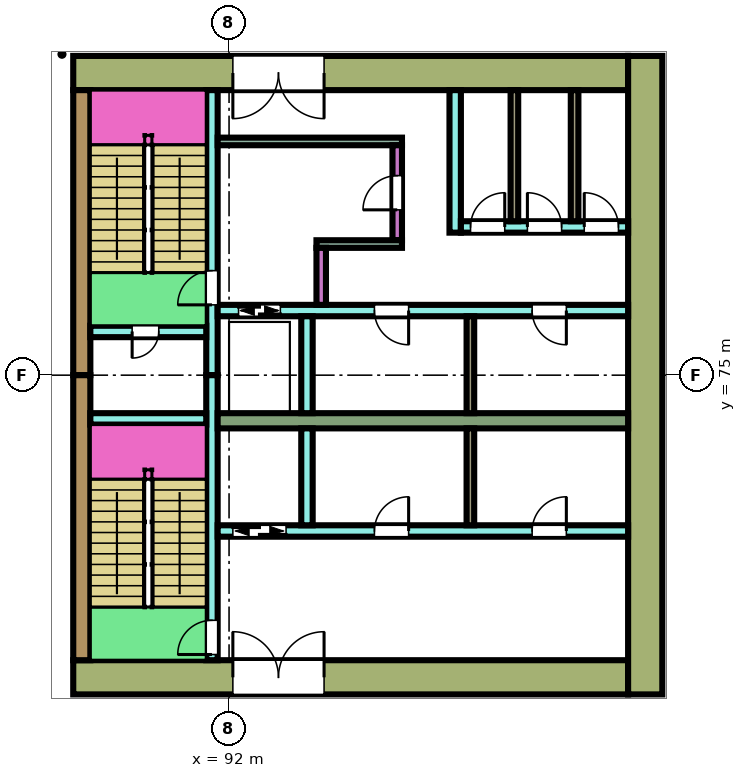
"""IFC4 building model, lengths in metres.
Left out: names, types, materials, properties, quantities, classifications, styles, units other than length and angle.
Written with IfcOpenShell. Run it as: python <this file> out.ifc"""

import sys

from ifc_helpers import new_model, si_unit, direction, frame, frame_2d, origin, place, context, subcontext, project, spatial, rectangle, extrude, element, fill, save


model = new_model("IFC4")
c1 = context("Model", 3, precision=1e-05, world=origin(), true_north=direction((0.0, 1.0)))
c2 = subcontext(c1, "Body", "Model", "MODEL_VIEW")
j1 = project(units=[si_unit("LENGTHUNIT", "METRE"), si_unit("PLANEANGLEUNIT", "RADIAN")], contexts=[c1])
p1 = place(None, origin())
s1 = spatial("IfcSite", under=j1, at=p1, CompositionType="ELEMENT")
p2 = place(p1, origin())
s2 = spatial("IfcBuilding", under=s1, at=p2, CompositionType="ELEMENT")
p3 = place(p2, frame((0.0, 0.0, -9.0)))
s3 = spatial("IfcBuildingStorey", under=s2, at=p3, CompositionType="ELEMENT", Elevation=-9.0)
p4 = place(p3, frame((87.9, 82.95, 0.0), z_axis=(0.0, 0.0, 1.0), x_axis=(1.0, 0.0, 0.0)))
e1 = element("IfcWall", 1, at=p4, inside=s3, PredefinedType="SHEAR", context=c2, shape_type="SweptSolid", body=[
    extrude(rectangle(XDim=14.6, YDim=0.9, at=frame_2d((7.3, 0.0))), origin(), (0.0, 0.0, 1.0), 4.1),
])
p5 = place(p4, frame((4.2, 0.0, 0.0)))
e2 = element("IfcOpeningElement", 2, at=p5, cuts=e1, PredefinedType="OPENING", context=c2, shape_type="SweptSolid", body=[
    extrude(rectangle(XDim=2.4, YDim=2.4, at=frame_2d((1.2, 1.2))), frame((0.0, 0.46, 0.0), z_axis=(0.0, -1.0, 0.0), x_axis=(1.0, 0.0, 0.0)), (0.0, 0.0, 1.0), 0.92),
])
p6 = place(p3, frame((87.9, 67.05, 0.0), z_axis=(0.0, 0.0, 1.0), x_axis=(1.0, 0.0, 0.0)))
e3 = element("IfcWall", 3, at=p6, inside=s3, PredefinedType="SHEAR", context=c2, shape_type="SweptSolid", body=[
    extrude(rectangle(XDim=14.6, YDim=0.9, at=frame_2d((7.3, 0.0))), origin(), (0.0, 0.0, 1.0), 4.1),
])
p7 = place(p6, frame((4.2, 0.0, 0.0)))
e4 = element("IfcOpeningElement", 4, at=p7, cuts=e3, PredefinedType="OPENING", context=c2, shape_type="SweptSolid", body=[
    extrude(rectangle(XDim=2.4, YDim=2.4, at=frame_2d((1.2, 1.2))), frame((0.0, 0.46, 0.0), z_axis=(0.0, -1.0, 0.0), x_axis=(1.0, 0.0, 0.0)), (0.0, 0.0, 1.0), 0.92),
])
for number, where, z_axis, x_axis in (
    (5, (88.125, 75.0, 0.0), (0.0, 0.0, 1.0), (0.0, 1.0, 0.0)),
    (6, (88.125, 67.5, 0.0), (0.0, 0.0, 1.0), (0.0, 1.0, 0.0)),
):
    element("IfcWall", number, at=place(p3, frame(where, z_axis=z_axis, x_axis=x_axis)), inside=s3, PredefinedType="SHEAR", context=c2, shape_type="SweptSolid", body=[
        extrude(rectangle(XDim=7.5, YDim=0.45, at=frame_2d((3.75, 0.0))), origin(), (0.0, 0.0, 1.0), 4.1),
    ])
p8 = place(p3, frame((102.95, 66.6, 0.0), z_axis=(0.0, 0.0, 1.0), x_axis=(0.0, 1.0, 0.0)))
e7 = element("IfcWall", 7, at=p8, inside=s3, PredefinedType="SHEAR", context=c2, shape_type="SweptSolid", body=[
    extrude(rectangle(XDim=16.8, YDim=0.9, at=frame_2d((8.4, 0.0))), origin(), (0.0, 0.0, 1.0), 4.1),
])
p9 = place(p3, frame((91.55, 75.0, 0.0), z_axis=(0.0, 0.0, 1.0), x_axis=(0.0, 1.0, 0.0)))
e8 = element("IfcWall", 8, at=p9, inside=s3, PredefinedType="SHEAR", context=c2, shape_type="SweptSolid", body=[
    extrude(rectangle(XDim=7.5, YDim=0.3, at=frame_2d((3.75, 0.0))), origin(), (0.0, 0.0, 1.0), 4.1),
])
p10 = place(p9, frame((1.85, 0.0, 0.0)))
e9 = element("IfcOpeningElement", 9, at=p10, cuts=e8, PredefinedType="OPENING", context=c2, shape_type="SweptSolid", body=[
    extrude(rectangle(XDim=0.9, YDim=2.1, at=frame_2d((0.45, 1.05))), frame((0.0, 0.16, 0.0), z_axis=(0.0, -1.0, 0.0), x_axis=(1.0, 0.0, 0.0)), (0.0, 0.0, 1.0), 0.32),
])
p11 = place(p3, frame((91.55, 67.5, 0.0), z_axis=(0.0, 0.0, 1.0), x_axis=(0.0, 1.0, 0.0)))
e10 = element("IfcWall", 10, at=p11, inside=s3, PredefinedType="SHEAR", context=c2, shape_type="SweptSolid", body=[
    extrude(rectangle(XDim=7.5, YDim=0.3, at=frame_2d((3.75, 0.0))), origin(), (0.0, 0.0, 1.0), 4.1),
])
p12 = place(p11, frame((0.15, 0.0, 0.0)))
e11 = element("IfcOpeningElement", 11, at=p12, cuts=e10, PredefinedType="OPENING", context=c2, shape_type="SweptSolid", body=[
    extrude(rectangle(XDim=0.9, YDim=2.1, at=frame_2d((0.45, 1.05))), frame((0.0, 0.16, 0.0), z_axis=(0.0, -1.0, 0.0), x_axis=(1.0, 0.0, 0.0)), (0.0, 0.0, 1.0), 0.32),
])
p13 = place(p3, frame((88.35, 76.15, 0.0), z_axis=(0.0, 0.0, 1.0), x_axis=(1.0, 0.0, 0.0)))
e12 = element("IfcWall", 12, at=p13, inside=s3, PredefinedType="SHEAR", context=c2, shape_type="SweptSolid", body=[
    extrude(rectangle(XDim=3.05, YDim=0.3, at=frame_2d((1.525, 0.0))), origin(), (0.0, 0.0, 1.0), 4.1),
])
p14 = place(p13, frame((1.1, 0.0, 0.0)))
e13 = element("IfcOpeningElement", 13, at=p14, cuts=e12, PredefinedType="OPENING", context=c2, shape_type="SweptSolid", body=[
    extrude(rectangle(XDim=0.7, YDim=2.0, at=frame_2d((0.35, 1.0))), frame((0.0, 0.16, 0.0), z_axis=(0.0, -1.0, 0.0), x_axis=(1.0, 0.0, 0.0)), (0.0, 0.0, 1.0), 0.32),
])
p15 = place(p3, frame((88.35, 73.85, 0.0), z_axis=(0.0, 0.0, 1.0), x_axis=(1.0, 0.0, 0.0)))
e14 = element("IfcWall", 14, at=p15, inside=s3, PredefinedType="SHEAR", context=c2, shape_type="SweptSolid", body=[
    extrude(rectangle(XDim=3.05, YDim=0.3, at=frame_2d((1.525, 0.0))), origin(), (0.0, 0.0, 1.0), 4.1),
])
p16 = place(p3, frame((91.7, 76.7, 0.0), z_axis=(0.0, 0.0, 1.0), x_axis=(1.0, 0.0, 0.0)))
e15 = element("IfcWall", 15, at=p16, inside=s3, PredefinedType="SHEAR", context=c2, shape_type="SweptSolid", body=[
    extrude(rectangle(XDim=10.8, YDim=0.3, at=frame_2d((5.4, 0.0))), origin(), (0.0, 0.0, 1.0), 4.1),
])
p17 = place(p16, frame((0.55, 0.0, 0.0)))
e16 = element("IfcOpeningElement", 16, at=p17, cuts=e15, PredefinedType="OPENING", context=c2, shape_type="SweptSolid", body=[
    extrude(rectangle(XDim=1.1, YDim=2.1, at=frame_2d((0.55, 1.05))), frame((0.0, 0.16, 0.0), z_axis=(0.0, -1.0, 0.0), x_axis=(1.0, 0.0, 0.0)), (0.0, 0.0, 1.0), 0.32),
])
p18 = place(p16, frame((4.125, 0.0, 0.0)))
e17 = element("IfcOpeningElement", 17, at=p18, cuts=e15, PredefinedType="OPENING", context=c2, shape_type="SweptSolid", body=[
    extrude(rectangle(XDim=0.9, YDim=2.1, at=frame_2d((0.45, 1.05))), frame((0.0, 0.16, 0.0), z_axis=(0.0, -1.0, 0.0), x_axis=(1.0, 0.0, 0.0)), (0.0, 0.0, 1.0), 0.32),
])
p19 = place(p16, frame((8.275, 0.0, 0.0)))
e18 = element("IfcOpeningElement", 18, at=p19, cuts=e15, PredefinedType="OPENING", context=c2, shape_type="SweptSolid", body=[
    extrude(rectangle(XDim=0.9, YDim=2.1, at=frame_2d((0.45, 1.05))), frame((0.0, 0.16, 0.0), z_axis=(0.0, -1.0, 0.0), x_axis=(1.0, 0.0, 0.0)), (0.0, 0.0, 1.0), 0.32),
])
p20 = place(p3, frame((91.7, 73.8, 0.0), z_axis=(0.0, 0.0, 1.0), x_axis=(1.0, 0.0, 0.0)))
e19 = element("IfcWall", 19, at=p20, inside=s3, PredefinedType="SHEAR", context=c2, shape_type="SweptSolid", body=[
    extrude(rectangle(XDim=10.8, YDim=0.4, at=frame_2d((5.4, 0.0))), origin(), (0.0, 0.0, 1.0), 4.1),
])
p21 = place(p3, frame((91.7, 70.9, 0.0), z_axis=(0.0, 0.0, 1.0), x_axis=(1.0, 0.0, 0.0)))
e20 = element("IfcWall", 20, at=p21, inside=s3, PredefinedType="SHEAR", context=c2, shape_type="SweptSolid", body=[
    extrude(rectangle(XDim=10.8, YDim=0.3, at=frame_2d((5.4, 0.0))), origin(), (0.0, 0.0, 1.0), 4.1),
])
p22 = place(p21, frame((0.4, 0.0, 0.0)))
e21 = element("IfcOpeningElement", 21, at=p22, cuts=e20, PredefinedType="OPENING", context=c2, shape_type="SweptSolid", body=[
    extrude(rectangle(XDim=1.4, YDim=2.1, at=frame_2d((0.7, 1.05))), frame((0.0, 0.16, 0.0), z_axis=(0.0, -1.0, 0.0), x_axis=(1.0, 0.0, 0.0)), (0.0, 0.0, 1.0), 0.32),
])
p23 = place(p21, frame((4.125, 0.0, 0.0)))
e22 = element("IfcOpeningElement", 22, at=p23, cuts=e20, PredefinedType="OPENING", context=c2, shape_type="SweptSolid", body=[
    extrude(rectangle(XDim=0.9, YDim=2.1, at=frame_2d((0.45, 1.05))), frame((0.0, 0.16, 0.0), z_axis=(0.0, -1.0, 0.0), x_axis=(1.0, 0.0, 0.0)), (0.0, 0.0, 1.0), 0.32),
])
p24 = place(p21, frame((8.275, 0.0, 0.0)))
e23 = element("IfcOpeningElement", 23, at=p24, cuts=e20, PredefinedType="OPENING", context=c2, shape_type="SweptSolid", body=[
    extrude(rectangle(XDim=0.9, YDim=2.1, at=frame_2d((0.45, 1.05))), frame((0.0, 0.16, 0.0), z_axis=(0.0, -1.0, 0.0), x_axis=(1.0, 0.0, 0.0)), (0.0, 0.0, 1.0), 0.32),
])
for number, where, z_axis, x_axis in (
    (24, (94.05, 74.0, 0.0), (0.0, 0.0, 1.0), (0.0, 1.0, 0.0)),
    (25, (94.05, 71.05, 0.0), (0.0, 0.0, 1.0), (0.0, 1.0, 0.0)),
):
    element("IfcWall", number, at=place(p3, frame(where, z_axis=z_axis, x_axis=x_axis)), inside=s3, PredefinedType="SHEAR", context=c2, shape_type="SweptSolid", body=[
        extrude(rectangle(XDim=2.55, YDim=0.3, at=frame_2d((1.275, 0.0))), origin(), (0.0, 0.0, 1.0), 4.1),
    ])
p25 = place(p3, frame((91.7, 81.15, 0.0), z_axis=(0.0, 0.0, 1.0), x_axis=(1.0, 0.0, 0.0)))
e26 = element("IfcWall", 26, at=p25, inside=s3, PredefinedType="SHEAR", context=c2, shape_type="SweptSolid", body=[
    extrude(rectangle(XDim=4.85, YDim=0.2, at=frame_2d((2.425, 0.0))), origin(), (0.0, 0.0, 1.0), 4.1),
])
p26 = place(p3, frame((96.425, 78.55, 0.0), z_axis=(0.0, 0.0, 1.0), x_axis=(0.0, 1.0, 0.0)))
e27 = element("IfcWall", 27, at=p26, inside=s3, PredefinedType="SHEAR", context=c2, shape_type="SweptSolid", body=[
    extrude(rectangle(XDim=2.5, YDim=0.25, at=frame_2d((1.25, 0.0))), origin(), (0.0, 0.0, 1.0), 4.1),
])
p27 = place(p26, frame((0.8, 0.0, 0.0)))
e28 = element("IfcOpeningElement", 28, at=p27, cuts=e27, PredefinedType="OPENING", context=c2, shape_type="SweptSolid", body=[
    extrude(rectangle(XDim=0.9, YDim=2.1, at=frame_2d((0.45, 1.05))), frame((0.0, 0.135, 0.0), z_axis=(0.0, -1.0, 0.0), x_axis=(1.0, 0.0, 0.0)), (0.0, 0.0, 1.0), 0.27),
])
p28 = place(p3, frame((94.3, 78.45, 0.0), z_axis=(0.0, 0.0, 1.0), x_axis=(1.0, 0.0, 0.0)))
e29 = element("IfcWall", 29, at=p28, inside=s3, PredefinedType="SHEAR", context=c2, shape_type="SweptSolid", body=[
    extrude(rectangle(XDim=2.25, YDim=0.2, at=frame_2d((1.125, 0.0))), origin(), (0.0, 0.0, 1.0), 4.1),
])
p29 = place(p3, frame((94.425, 76.85, 0.0), z_axis=(0.0, 0.0, 1.0), x_axis=(0.0, 1.0, 0.0)))
e30 = element("IfcWall", 30, at=p29, inside=s3, PredefinedType="SHEAR", context=c2, shape_type="SweptSolid", body=[
    extrude(rectangle(XDim=1.5, YDim=0.25, at=frame_2d((0.75, 0.0))), origin(), (0.0, 0.0, 1.0), 4.1),
])
p30 = place(p3, frame((97.95, 78.75, 0.0), z_axis=(0.0, 0.0, 1.0), x_axis=(0.0, 1.0, 0.0)))
e31 = element("IfcWall", 31, at=p30, inside=s3, PredefinedType="SHEAR", context=c2, shape_type="SweptSolid", body=[
    extrude(rectangle(XDim=3.75, YDim=0.3, at=frame_2d((1.875, 0.0))), origin(), (0.0, 0.0, 1.0), 4.1),
])
p31 = place(p3, frame((98.1, 78.9, 0.0), z_axis=(0.0, 0.0, 1.0), x_axis=(1.0, 0.0, 0.0)))
e32 = element("IfcWall", 32, at=p31, inside=s3, PredefinedType="SHEAR", context=c2, shape_type="SweptSolid", body=[
    extrude(rectangle(XDim=4.4, YDim=0.3, at=frame_2d((2.2, 0.0))), origin(), (0.0, 0.0, 1.0), 4.1),
])
p32 = place(p31, frame((0.254, 0.0, 0.0)))
e33 = element("IfcOpeningElement", 33, at=p32, cuts=e32, PredefinedType="OPENING", context=c2, shape_type="SweptSolid", body=[
    extrude(rectangle(XDim=0.9, YDim=2.1, at=frame_2d((0.45, 1.05))), frame((0.0, 0.16, 0.0), z_axis=(0.0, -1.0, 0.0), x_axis=(1.0, 0.0, 0.0)), (0.0, 0.0, 1.0), 0.32),
])
p33 = place(p31, frame((1.75, 0.0, 0.0)))
e34 = element("IfcOpeningElement", 34, at=p33, cuts=e32, PredefinedType="OPENING", context=c2, shape_type="SweptSolid", body=[
    extrude(rectangle(XDim=0.9, YDim=2.1, at=frame_2d((0.45, 1.05))), frame((0.0, 0.16, 0.0), z_axis=(0.0, -1.0, 0.0), x_axis=(1.0, 0.0, 0.0)), (0.0, 0.0, 1.0), 0.32),
])
p34 = place(p31, frame((3.246, 0.0, 0.0)))
e35 = element("IfcOpeningElement", 35, at=p34, cuts=e32, PredefinedType="OPENING", context=c2, shape_type="SweptSolid", body=[
    extrude(rectangle(XDim=0.9, YDim=2.1, at=frame_2d((0.45, 1.05))), frame((0.0, 0.16, 0.0), z_axis=(0.0, -1.0, 0.0), x_axis=(1.0, 0.0, 0.0)), (0.0, 0.0, 1.0), 0.32),
])
for number, where, z_axis, x_axis in (
    (36, (98.35, 74.0, 0.0), (0.0, 0.0, 1.0), (0.0, 1.0, 0.0)),
    (37, (98.35, 71.05, 0.0), (0.0, 0.0, 1.0), (0.0, 1.0, 0.0)),
):
    element("IfcWall", number, at=place(p3, frame(where, z_axis=z_axis, x_axis=x_axis)), inside=s3, PredefinedType="PARTITIONING", context=c2, shape_type="SweptSolid", body=[
        extrude(rectangle(XDim=2.55, YDim=0.2, at=frame_2d((1.275, 0.0))), origin(), (0.0, 0.0, 1.0), 4.1),
    ])
for number, where, z_axis, x_axis in (
    (38, (99.508, 79.05, 0.0), (0.0, 0.0, 1.0), (0.0, 1.0, 0.0)),
    (39, (101.092, 79.05, 0.0), (0.0, 0.0, 1.0), (0.0, 1.0, 0.0)),
):
    element("IfcWall", number, at=place(p3, frame(where, z_axis=z_axis, x_axis=x_axis)), inside=s3, PredefinedType="PARTITIONING", context=c2, shape_type="SweptSolid", body=[
        extrude(rectangle(XDim=3.45, YDim=0.2, at=frame_2d((1.725, 0.0))), origin(), (0.0, 0.0, 1.0), 4.1),
    ])
p35 = place(p14, frame((0.7, 0.0, 0.0), z_axis=(0.0, 0.0, 1.0), x_axis=(-1.0, 0.0, 0.0)))
e40 = element("IfcDoor", 40, at=p35, inside=s3, OperationType="SINGLE_SWING_RIGHT", PredefinedType="DOOR", context=c2, shape_type="SweptSolid", body=[
    extrude(rectangle(XDim=0.7, YDim=2.0, at=frame_2d((0.35, 1.0))), frame((0.0, 0.025, 0.0), z_axis=(0.0, -1.0, 0.0), x_axis=(1.0, 0.0, 0.0)), (0.0, 0.0, 1.0), 0.05),
])
fill(e13, e40)
p36 = place(p10, origin())
e41 = element("IfcDoor", 41, at=p36, inside=s3, OperationType="SINGLE_SWING_LEFT", PredefinedType="DOOR", context=c2, shape_type="SweptSolid", body=[
    extrude(rectangle(XDim=0.9, YDim=2.1, at=frame_2d((0.45, 1.05))), frame((0.0, 0.025, 0.0), z_axis=(0.0, -1.0, 0.0), x_axis=(1.0, 0.0, 0.0)), (0.0, 0.0, 1.0), 0.05),
])
fill(e9, e41)
p37 = place(p12, origin())
e42 = element("IfcDoor", 42, at=p37, inside=s3, OperationType="SINGLE_SWING_LEFT", PredefinedType="DOOR", context=c2, shape_type="SweptSolid", body=[
    extrude(rectangle(XDim=0.9, YDim=2.1, at=frame_2d((0.45, 1.05))), frame((0.0, 0.025, 0.0), z_axis=(0.0, -1.0, 0.0), x_axis=(1.0, 0.0, 0.0)), (0.0, 0.0, 1.0), 0.05),
])
fill(e11, e42)
p38 = place(p17, origin())
e43 = element("IfcDoor", 43, at=p38, inside=s3, OperationType="DOUBLE_DOOR_SLIDING", PredefinedType="DOOR", context=c2, shape_type="SweptSolid", body=[
    extrude(rectangle(XDim=1.1, YDim=2.1, at=frame_2d((0.55, 1.05))), frame((0.0, 0.025, 0.0), z_axis=(0.0, -1.0, 0.0), x_axis=(1.0, 0.0, 0.0)), (0.0, 0.0, 1.0), 0.05),
])
fill(e16, e43)
p39 = place(p18, frame((0.9, 0.0, 0.0), z_axis=(0.0, 0.0, 1.0), x_axis=(-1.0, 0.0, 0.0)))
e44 = element("IfcDoor", 44, at=p39, inside=s3, OperationType="SINGLE_SWING_LEFT", PredefinedType="DOOR", context=c2, shape_type="SweptSolid", body=[
    extrude(rectangle(XDim=0.9, YDim=2.1, at=frame_2d((0.45, 1.05))), frame((0.0, 0.025, 0.0), z_axis=(0.0, -1.0, 0.0), x_axis=(1.0, 0.0, 0.0)), (0.0, 0.0, 1.0), 0.05),
])
fill(e17, e44)
p40 = place(p19, frame((0.9, 0.0, 0.0), z_axis=(0.0, 0.0, 1.0), x_axis=(-1.0, 0.0, 0.0)))
e45 = element("IfcDoor", 45, at=p40, inside=s3, OperationType="SINGLE_SWING_LEFT", PredefinedType="DOOR", context=c2, shape_type="SweptSolid", body=[
    extrude(rectangle(XDim=0.9, YDim=2.1, at=frame_2d((0.45, 1.05))), frame((0.0, 0.025, 0.0), z_axis=(0.0, -1.0, 0.0), x_axis=(1.0, 0.0, 0.0)), (0.0, 0.0, 1.0), 0.05),
])
fill(e18, e45)
p41 = place(p22, origin())
e46 = element("IfcDoor", 46, at=p41, inside=s3, OperationType="DOUBLE_DOOR_SLIDING", PredefinedType="DOOR", context=c2, shape_type="SweptSolid", body=[
    extrude(rectangle(XDim=1.4, YDim=2.1, at=frame_2d((0.7, 1.05))), frame((0.0, 0.025, 0.0), z_axis=(0.0, -1.0, 0.0), x_axis=(1.0, 0.0, 0.0)), (0.0, 0.0, 1.0), 0.05),
])
fill(e21, e46)
p42 = place(p23, origin())
e47 = element("IfcDoor", 47, at=p42, inside=s3, OperationType="SINGLE_SWING_RIGHT", PredefinedType="DOOR", context=c2, shape_type="SweptSolid", body=[
    extrude(rectangle(XDim=0.9, YDim=2.1, at=frame_2d((0.45, 1.05))), frame((0.0, 0.025, 0.0), z_axis=(0.0, -1.0, 0.0), x_axis=(1.0, 0.0, 0.0)), (0.0, 0.0, 1.0), 0.05),
])
fill(e22, e47)
p43 = place(p24, origin())
e48 = element("IfcDoor", 48, at=p43, inside=s3, OperationType="SINGLE_SWING_RIGHT", PredefinedType="DOOR", context=c2, shape_type="SweptSolid", body=[
    extrude(rectangle(XDim=0.9, YDim=2.1, at=frame_2d((0.45, 1.05))), frame((0.0, 0.025, 0.0), z_axis=(0.0, -1.0, 0.0), x_axis=(1.0, 0.0, 0.0)), (0.0, 0.0, 1.0), 0.05),
])
fill(e23, e48)
p44 = place(p27, origin())
e49 = element("IfcDoor", 49, at=p44, inside=s3, OperationType="SINGLE_SWING_LEFT", PredefinedType="DOOR", context=c2, shape_type="SweptSolid", body=[
    extrude(rectangle(XDim=0.9, YDim=2.1, at=frame_2d((0.45, 1.05))), frame((0.0, 0.025, 0.0), z_axis=(0.0, -1.0, 0.0), x_axis=(1.0, 0.0, 0.0)), (0.0, 0.0, 1.0), 0.05),
])
fill(e28, e49)
p45 = place(p32, origin())
e50 = element("IfcDoor", 50, at=p45, inside=s3, OperationType="SINGLE_SWING_RIGHT", PredefinedType="DOOR", context=c2, shape_type="SweptSolid", body=[
    extrude(rectangle(XDim=0.9, YDim=2.1, at=frame_2d((0.45, 1.05))), frame((0.0, 0.025, 0.0), z_axis=(0.0, -1.0, 0.0), x_axis=(1.0, 0.0, 0.0)), (0.0, 0.0, 1.0), 0.05),
])
fill(e33, e50)
p46 = place(p33, origin())
e51 = element("IfcDoor", 51, at=p46, inside=s3, OperationType="SINGLE_SWING_LEFT", PredefinedType="DOOR", context=c2, shape_type="SweptSolid", body=[
    extrude(rectangle(XDim=0.9, YDim=2.1, at=frame_2d((0.45, 1.05))), frame((0.0, 0.025, 0.0), z_axis=(0.0, -1.0, 0.0), x_axis=(1.0, 0.0, 0.0)), (0.0, 0.0, 1.0), 0.05),
])
fill(e34, e51)
p47 = place(p34, origin())
e52 = element("IfcDoor", 52, at=p47, inside=s3, OperationType="SINGLE_SWING_LEFT", PredefinedType="DOOR", context=c2, shape_type="SweptSolid", body=[
    extrude(rectangle(XDim=0.9, YDim=2.1, at=frame_2d((0.45, 1.05))), frame((0.0, 0.025, 0.0), z_axis=(0.0, -1.0, 0.0), x_axis=(1.0, 0.0, 0.0)), (0.0, 0.0, 1.0), 0.05),
])
fill(e35, e52)
p48 = place(p5, frame((2.4, 0.0, 0.0), z_axis=(0.0, 0.0, 1.0), x_axis=(-1.0, 0.0, 0.0)))
e53 = element("IfcDoor", 53, at=p48, inside=s3, OperationType="DOUBLE_DOOR_SINGLE_SWING", PredefinedType="DOOR", context=c2, shape_type="SweptSolid", body=[
    extrude(rectangle(XDim=2.4, YDim=2.4, at=frame_2d((1.2, 1.2))), frame((0.0, 0.025, 0.0), z_axis=(0.0, -1.0, 0.0), x_axis=(1.0, 0.0, 0.0)), (0.0, 0.0, 1.0), 0.05),
])
fill(e2, e53)
p49 = place(p7, origin())
e54 = element("IfcDoor", 54, at=p49, inside=s3, OperationType="DOUBLE_DOOR_SINGLE_SWING", PredefinedType="DOOR", context=c2, shape_type="SweptSolid", body=[
    extrude(rectangle(XDim=2.4, YDim=2.4, at=frame_2d((1.2, 1.2))), frame((0.0, 0.025, 0.0), z_axis=(0.0, -1.0, 0.0), x_axis=(1.0, 0.0, 0.0)), (0.0, 0.0, 1.0), 0.05),
])
fill(e4, e54)
save(model, sys.argv[1])
